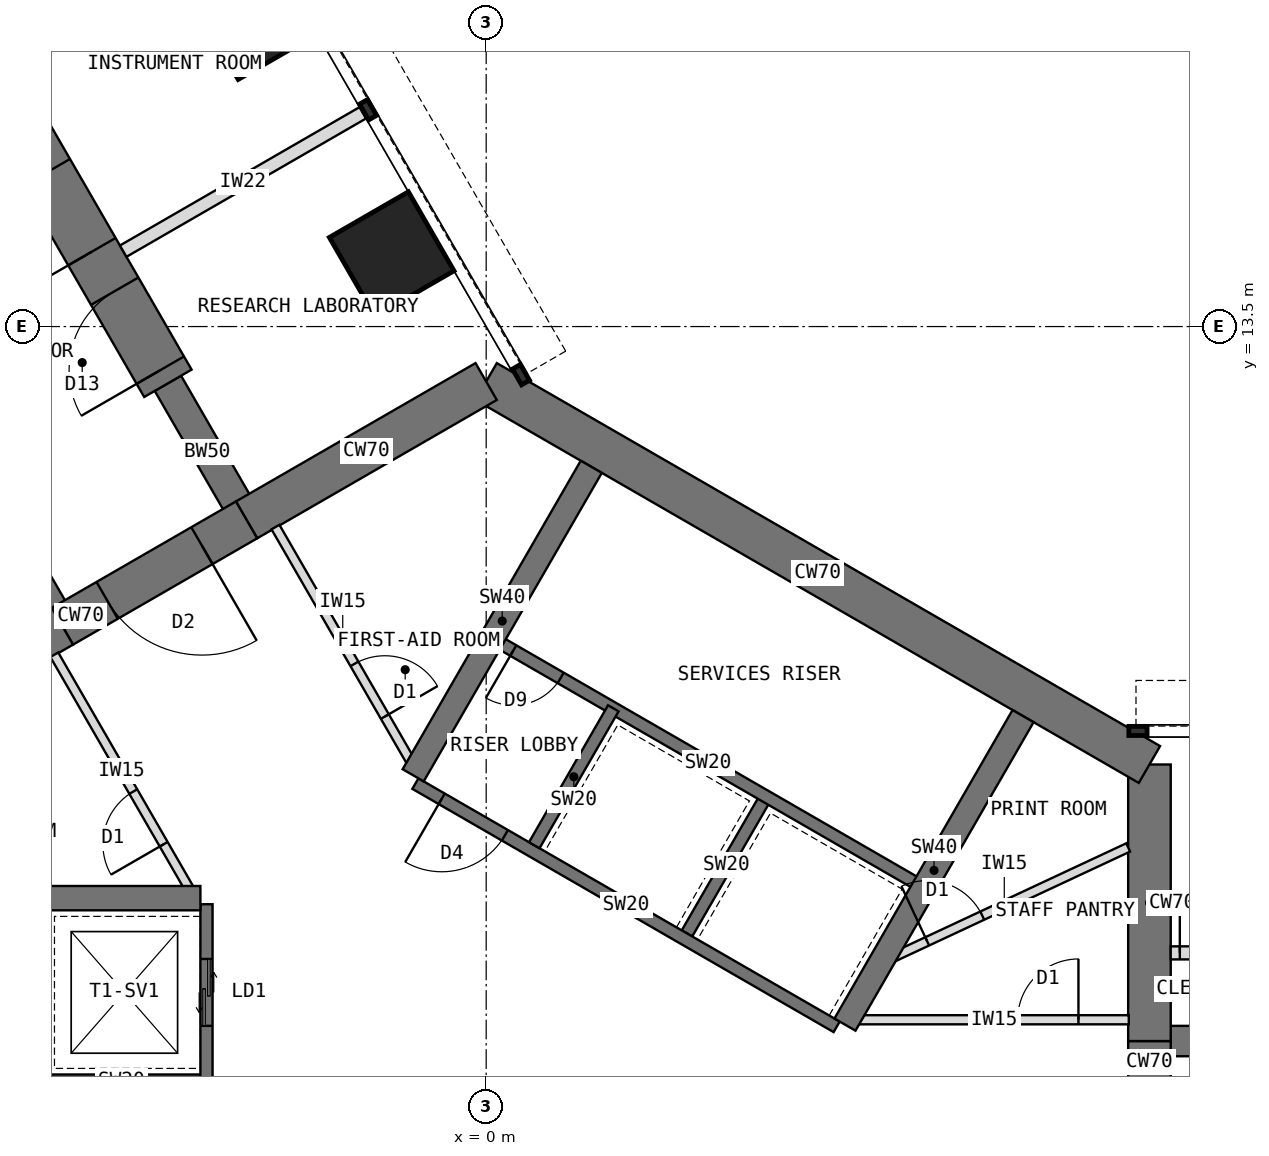
"""IFC4 building model, lengths in metres.
Left out: names, types, materials, properties, quantities, classifications, styles, units other than length and angle.
Written with IfcOpenShell. Run it as: python <this file> out.ifc"""

import sys

from ifc_helpers import new_model, si_unit, direction, frame, frame_2d, origin, origin_2d, place, context, subcontext, project, spatial, rectangle, extrude, element, fill, save


model = new_model("IFC4")
c1 = context("Model", 3, precision=1e-05, world=origin(), true_north=direction((0.0, 1.0)))
c2 = subcontext(c1, "Body", "Model", "MODEL_VIEW")
j1 = project(units=[si_unit("LENGTHUNIT", "METRE"), si_unit("PLANEANGLEUNIT", "RADIAN")], contexts=[c1])
p1 = place(None, origin())
s1 = spatial("IfcSite", under=j1, at=p1, CompositionType="ELEMENT")
p2 = place(p1, origin())
s2 = spatial("IfcBuilding", under=s1, at=p2, CompositionType="ELEMENT")
p3 = place(p2, frame((0.0, 0.0, 36.5)))
s3 = spatial("IfcBuildingStorey", under=s2, at=p3, CompositionType="ELEMENT", Elevation=36.5)
p4 = place(p3, frame((10.908, -1.75, 0.0), z_axis=(0.0, 0.0, 1.0), x_axis=(0.0, 1.0, 0.0)))
e1 = element("IfcWall", 1, at=p4, inside=s3, PredefinedType="SHEAR", context=c2, shape_type="SweptSolid", body=[
    extrude(rectangle(XDim=3.5, YDim=0.7, at=frame_2d((1.75, 0.0))), origin(), (0.0, 0.0, 1.0), 4.0),
])
p5 = place(p4, frame((0.85, 0.0, 0.0)))
e2 = element("IfcOpeningElement", 2, at=p5, cuts=e1, PredefinedType="OPENING", context=c2, shape_type="SweptSolid", body=[
    extrude(rectangle(XDim=1.8, YDim=2.1, at=frame_2d((0.9, 1.05))), frame((0.0, 0.36, 0.0), z_axis=(0.0, -1.0, 0.0), x_axis=(1.0, 0.0, 0.0)), (0.0, 0.0, 1.0), 0.72),
])
p6 = place(p3, frame((10.908, 1.75, 0.0), z_axis=(0.0, 0.0, 1.0), x_axis=(0.0, 1.0, 0.0)))
e3 = element("IfcWall", 3, at=p6, inside=s3, PredefinedType="SHEAR", context=c2, shape_type="SweptSolid", body=[
    extrude(rectangle(XDim=4.548, YDim=0.7, at=frame_2d((2.274, 0.0))), origin(), (0.0, 0.0, 1.0), 4.0),
])
p7 = place(p3, frame((10.908, 6.298, 0.0), z_axis=(0.0, 0.0, 1.0), x_axis=(-0.866021940709, 0.500005998175, 0.0)))
e4 = element("IfcWall", 4, at=p7, inside=s3, PredefinedType="SHEAR", context=c2, shape_type="SweptSolid", body=[
    extrude(rectangle(XDim=12.596, YDim=0.7, at=frame_2d((6.298, 0.0))), origin(), (0.0, 0.0, 1.0), 4.0),
])
p8 = place(p3, frame((0.0, 12.596, 0.0), z_axis=(0.0, 0.0, 1.0), x_axis=(-0.866011268655, -0.500024481964, 0.0)))
e5 = element("IfcWall", 5, at=p8, inside=s3, PredefinedType="SHEAR", context=c2, shape_type="SweptSolid", body=[
    extrude(rectangle(XDim=4.548, YDim=0.7, at=frame_2d((2.274, 0.0))), origin(), (0.0, 0.0, 1.0), 4.0),
])
p9 = place(p3, frame((-3.939, 10.322, 0.0), z_axis=(0.0, 0.0, 1.0), x_axis=(-0.866019471182, -0.500010275428, 0.0)))
e6 = element("IfcWall", 6, at=p9, inside=s3, PredefinedType="SHEAR", context=c2, shape_type="SweptSolid", body=[
    extrude(rectangle(XDim=3.5, YDim=0.7, at=frame_2d((1.75, 0.0))), origin(), (0.0, 0.0, 1.0), 4.0),
])
p10 = place(p9, frame((0.85, 0.0, 0.0)))
e7 = element("IfcOpeningElement", 7, at=p10, cuts=e6, PredefinedType="OPENING", context=c2, shape_type="SweptSolid", body=[
    extrude(rectangle(XDim=1.8, YDim=2.1, at=frame_2d((0.9, 1.05))), frame((0.0, 0.36, 0.0), z_axis=(0.0, -1.0, 0.0), x_axis=(1.0, 0.0, 0.0)), (0.0, 0.0, 1.0), 0.72),
])
p11 = place(p3, frame((-6.97, 8.572, 0.0), z_axis=(0.0, 0.0, 1.0), x_axis=(-0.866034513004, -0.499984222037, 0.0)))
e8 = element("IfcWall", 8, at=p11, inside=s3, PredefinedType="SHEAR", context=c2, shape_type="SweptSolid", body=[
    extrude(rectangle(XDim=4.548, YDim=0.7, at=frame_2d((2.274, 0.0))), origin(), (0.0, 0.0, 1.0), 4.0),
])
p12 = place(p3, frame((10.908, 1.75, 0.0), z_axis=(0.0, 0.0, 1.0), x_axis=(1.0, 0.0, 0.0)))
e9 = element("IfcWall", 9, at=p12, inside=s3, PredefinedType="SHEAR", context=c2, shape_type="SweptSolid", body=[
    extrude(rectangle(XDim=2.592, YDim=0.5, at=frame_2d((1.296, 0.0))), origin(), (0.0, 0.0, 1.0), 4.0),
])
for number, where, z_axis, x_axis in (
    (10, (-6.97, 8.572, 0.0), (0.0, 0.0, 1.0), (-0.5, 0.866, 0.0)),
    (11, (-3.939, 10.322, 0.0), (0.0, 0.0, 1.0), (-0.5, 0.866, 0.0)),
):
    element("IfcWall", number, at=place(p3, frame(where, z_axis=z_axis, x_axis=x_axis)), inside=s3, PredefinedType="SHEAR", context=c2, shape_type="SweptSolid", body=[
        extrude(rectangle(XDim=2.592, YDim=0.5, at=frame_2d((1.296, 0.0))), origin(), (0.0, 0.0, 1.0), 4.0),
    ])
p13 = place(p3, frame((-5.234, 12.566, 0.0), z_axis=(0.0, 0.0, 1.0), x_axis=(-0.500010103361, 0.866019570528, 0.0)))
e12 = element("IfcWall", 12, at=p13, inside=s3, PredefinedType="SHEAR", context=c2, shape_type="SweptSolid", body=[
    extrude(rectangle(XDim=13.2, YDim=0.9, at=frame_2d((6.6, 0.0))), origin(), (0.0, 0.0, 1.0), 4.0),
])
p14 = place(p13, frame((0.25, 0.0, 0.0)))
e13 = element("IfcOpeningElement", 13, at=p14, cuts=e12, PredefinedType="OPENING", context=c2, shape_type="SweptSolid", body=[
    extrude(rectangle(XDim=1.5, YDim=2.1, at=frame_2d((0.75, 1.05))), frame((0.0, 0.46, 0.0), z_axis=(0.0, -1.0, 0.0), x_axis=(1.0, 0.0, 0.0)), (0.0, 0.0, 1.0), 0.92),
])
p15 = place(p13, frame((2.5, 0.0, 0.0)))
e14 = element("IfcOpeningElement", 14, at=p15, cuts=e12, PredefinedType="OPENING", context=c2, shape_type="SweptSolid", body=[
    extrude(rectangle(XDim=1.5, YDim=2.1, at=frame_2d((0.75, 1.05))), frame((0.0, 0.46, 0.0), z_axis=(0.0, -1.0, 0.0), x_axis=(1.0, 0.0, 0.0)), (0.0, 0.0, 1.0), 0.92),
])
for number, where, z_axis, x_axis in (
    (15, (-1.554, 14.691, 0.0), (0.0, 0.0, 1.0), (0.866, 0.5, 0.0)),
    (16, (-3.804, 18.588, 0.0), (0.0, 0.0, 1.0), (0.866, 0.5, 0.0)),
):
    element("IfcColumn", number, at=place(p3, frame(where, z_axis=z_axis, x_axis=x_axis)), inside=s3, PredefinedType="COLUMN", context=c2, shape_type="SweptSolid", body=[
        extrude(rectangle(XDim=1.5, YDim=1.5, at=origin_2d()), origin(), (0.0, 0.0, 1.0), 4.0),
    ])
p16 = place(p3, frame((5.764, 1.984, 0.0), z_axis=(0.0, 0.0, 1.0), x_axis=(-0.866026010844, 0.49999894854, 0.0)))
e17 = element("IfcWall", 17, at=p16, inside=s3, PredefinedType="SHEAR", context=c2, shape_type="SweptSolid", body=[
    extrude(rectangle(XDim=8.0, YDim=0.2, at=frame_2d((4.0, 0.0))), origin(), (0.0, 0.0, 1.0), 4.0),
])
p17 = place(p16, frame((6.3, 0.0, 0.0)))
e18 = element("IfcOpeningElement", 18, at=p17, cuts=e17, PredefinedType="OPENING", context=c2, shape_type="SweptSolid", body=[
    extrude(rectangle(XDim=1.2, YDim=2.1, at=frame_2d((0.6, 1.05))), frame((0.0, 0.11, 0.0), z_axis=(0.0, -1.0, 0.0), x_axis=(1.0, 0.0, 0.0)), (0.0, 0.0, 1.0), 0.22),
])
for number, where, z_axis, x_axis in (
    (19, (3.303, 3.52, 0.0), (0.0, 0.0, 1.0), (0.5, 0.866, 0.0)),
    (20, (0.791, 4.97, 0.0), (0.0, 0.0, 1.0), (0.5, 0.866, 0.0)),
):
    element("IfcWall", number, at=place(p3, frame(where, z_axis=z_axis, x_axis=x_axis)), inside=s3, PredefinedType="SHEAR", context=c2, shape_type="SweptSolid", body=[
        extrude(rectangle(XDim=2.6, YDim=0.2, at=frame_2d((1.3, 0.0))), origin(), (0.0, 0.0, 1.0), 4.0),
    ])
p18 = place(p3, frame((7.114, 4.322, 0.0), z_axis=(0.0, 0.0, 1.0), x_axis=(-0.866026010844, 0.49999894854, 0.0)))
e21 = element("IfcWall", 21, at=p18, inside=s3, PredefinedType="SHEAR", context=c2, shape_type="SweptSolid", body=[
    extrude(rectangle(XDim=8.0, YDim=0.2, at=frame_2d((4.0, 0.0))), origin(), (0.0, 0.0, 1.0), 4.0),
])
p19 = place(p18, frame((6.8, 0.0, 0.0)))
e22 = element("IfcOpeningElement", 22, at=p19, cuts=e21, PredefinedType="OPENING", context=c2, shape_type="SweptSolid", body=[
    extrude(rectangle(XDim=0.9, YDim=2.1, at=frame_2d((0.45, 1.05))), frame((0.0, 0.11, 0.0), z_axis=(0.0, -1.0, 0.0), x_axis=(1.0, 0.0, 0.0)), (0.0, 0.0, 1.0), 0.22),
])
for number, where, z_axis, x_axis in (
    (23, (-1.201, 6.12, 0.0), (0.0, 0.0, 1.0), (0.5, 0.866, 0.0)),
    (24, (5.901, 2.02, 0.0), (0.0, 0.0, 1.0), (0.5, 0.866, 0.0)),
):
    element("IfcWall", number, at=place(p3, frame(where, z_axis=z_axis, x_axis=x_axis)), inside=s3, PredefinedType="SHEAR", context=c2, shape_type="SweptSolid", body=[
        extrude(rectangle(XDim=5.858, YDim=0.4, at=frame_2d((2.929, 0.0))), origin(), (0.0, 0.0, 1.0), 4.0),
    ])
p20 = place(p3, frame((-4.6, 4.0, 0.0), z_axis=(0.0, 0.0, 1.0), x_axis=(0.0, -1.0, 0.0)))
e25 = element("IfcWall", 25, at=p20, inside=s3, PredefinedType="SHEAR", context=c2, shape_type="SweptSolid", body=[
    extrude(rectangle(XDim=8.0, YDim=0.2, at=frame_2d((4.0, 0.0))), origin(), (0.0, 0.0, 1.0), 4.0),
])
p21 = place(p20, frame((6.3, 0.0, 0.0)))
e26 = element("IfcOpeningElement", 26, at=p21, cuts=e25, PredefinedType="OPENING", context=c2, shape_type="SweptSolid", body=[
    extrude(rectangle(XDim=1.2, YDim=2.1, at=frame_2d((0.6, 1.05))), frame((0.0, 0.11, 0.0), z_axis=(0.0, -1.0, 0.0), x_axis=(1.0, 0.0, 0.0)), (0.0, 0.0, 1.0), 0.22),
])
p22 = place(p20, frame((0.9, 0.0, 0.0)))
e27 = element("IfcOpeningElement", 27, at=p22, cuts=e25, PredefinedType="OPENING", context=c2, shape_type="SweptSolid", body=[
    extrude(rectangle(XDim=1.1, YDim=2.2, at=frame_2d((0.55, 1.1))), frame((0.0, 0.11, 0.0), z_axis=(0.0, -1.0, 0.0), x_axis=(1.0, 0.0, 0.0)), (0.0, 0.0, 1.0), 0.22),
])
p23 = place(p3, frame((-4.7, 1.1, 0.0), z_axis=(0.0, 0.0, 1.0), x_axis=(-1.0, 0.0, 0.0)))
e28 = element("IfcWall", 28, at=p23, inside=s3, PredefinedType="SHEAR", context=c2, shape_type="SweptSolid", body=[
    extrude(rectangle(XDim=2.6, YDim=0.2, at=frame_2d((1.3, 0.0))), origin(), (0.0, 0.0, 1.0), 4.0),
])
p24 = place(p3, frame((-4.7, 4.1, 0.0), z_axis=(0.0, 0.0, 1.0), x_axis=(-1.0, 0.0, 0.0)))
e29 = element("IfcWall", 29, at=p24, inside=s3, PredefinedType="SHEAR", context=c2, shape_type="SweptSolid", body=[
    extrude(rectangle(XDim=5.858, YDim=0.4, at=frame_2d((2.929, 0.0))), origin(), (0.0, 0.0, 1.0), 4.0),
])
p25 = place(p3, frame((11.258, 3.2, 0.0), z_axis=(0.0, 0.0, 1.0), x_axis=(1.0, 0.0, 0.0)))
e30 = element("IfcWall", 30, at=p25, inside=s3, PredefinedType="PARTITIONING", context=c2, shape_type="SweptSolid", body=[
    extrude(rectangle(XDim=2.4, YDim=0.215, at=frame_2d((1.2, 0.0))), origin(), (0.0, 0.0, 1.0), 3.8),
])
p26 = place(p25, frame((0.15, 0.0, 0.0)))
e31 = element("IfcOpeningElement", 31, at=p26, cuts=e30, PredefinedType="OPENING", context=c2, shape_type="SweptSolid", body=[
    extrude(rectangle(XDim=0.9, YDim=2.1, at=frame_2d((0.45, 1.05))), frame((0.0, 0.117, 0.0), z_axis=(0.0, -1.0, 0.0), x_axis=(1.0, 0.0, 0.0)), (0.0, 0.0, 1.0), 0.235),
])
p27 = place(p3, frame((-5.97, 14.74, 0.0), z_axis=(0.0, 0.0, 1.0), x_axis=(0.866035472144, 0.499982560684, 0.0)))
e32 = element("IfcWall", 32, at=p27, inside=s3, PredefinedType="PARTITIONING", context=c2, shape_type="SweptSolid", body=[
    extrude(rectangle(XDim=4.55, YDim=0.215, at=frame_2d((2.275, 0.0))), origin(), (0.0, 0.0, 1.0), 3.8),
])
p28 = place(p3, frame((-4.89, 4.27, 0.0), z_axis=(0.0, 0.0, 1.0), x_axis=(-0.500007369519, 0.866021148949, 0.0)))
e33 = element("IfcWall", 33, at=p28, inside=s3, PredefinedType="PARTITIONING", context=c2, shape_type="SweptSolid", body=[
    extrude(rectangle(XDim=4.426, YDim=0.15, at=frame_2d((2.213, 0.0))), origin(), (0.0, 0.0, 1.0), 3.8),
])
p29 = place(p28, frame((0.828, 0.0, 0.0)))
e34 = element("IfcOpeningElement", 34, at=p29, cuts=e33, PredefinedType="OPENING", context=c2, shape_type="SweptSolid", body=[
    extrude(rectangle(XDim=1.0, YDim=2.1, at=frame_2d((0.5, 1.05))), frame((0.0, 0.085, 0.0), z_axis=(0.0, -1.0, 0.0), x_axis=(1.0, 0.0, 0.0)), (0.0, 0.0, 1.0), 0.17),
])
p30 = place(p3, frame((-3.466, 10.202, 0.0), z_axis=(0.0, 0.0, 1.0), x_axis=(0.500007369519, -0.866021148949, 0.0)))
e35 = element("IfcWall", 35, at=p30, inside=s3, PredefinedType="PARTITIONING", context=c2, shape_type="SweptSolid", body=[
    extrude(rectangle(XDim=4.426, YDim=0.15, at=frame_2d((2.213, 0.0))), origin(), (0.0, 0.0, 1.0), 3.8),
])
p31 = place(p30, frame((2.598, 0.0, 0.0)))
e36 = element("IfcOpeningElement", 36, at=p31, cuts=e35, PredefinedType="OPENING", context=c2, shape_type="SweptSolid", body=[
    extrude(rectangle(XDim=1.0, YDim=2.1, at=frame_2d((0.5, 1.05))), frame((0.0, 0.085, 0.0), z_axis=(0.0, -1.0, 0.0), x_axis=(1.0, 0.0, 0.0)), (0.0, 0.0, 1.0), 0.17),
])
p32 = place(p3, frame((6.143, 2.1, 0.0), z_axis=(0.0, 0.0, 1.0), x_axis=(1.0, 0.0, 0.0)))
e37 = element("IfcWall", 37, at=p32, inside=s3, PredefinedType="PARTITIONING", context=c2, shape_type="SweptSolid", body=[
    extrude(rectangle(XDim=4.426, YDim=0.15, at=frame_2d((2.213, 0.0))), origin(), (0.0, 0.0, 1.0), 3.8),
])
p33 = place(p32, frame((2.598, 0.0, 0.0)))
e38 = element("IfcOpeningElement", 38, at=p33, cuts=e37, PredefinedType="OPENING", context=c2, shape_type="SweptSolid", body=[
    extrude(rectangle(XDim=1.0, YDim=2.1, at=frame_2d((0.5, 1.05))), frame((0.0, 0.085, 0.0), z_axis=(0.0, -1.0, 0.0), x_axis=(1.0, 0.0, 0.0)), (0.0, 0.0, 1.0), 0.17),
])
p34 = place(p3, frame((6.483, 3.03, 0.0), z_axis=(0.0, 0.0, 1.0), x_axis=(0.905977801603, 0.423325197694, 0.0)))
e39 = element("IfcWall", 39, at=p34, inside=s3, PredefinedType="PARTITIONING", context=c2, shape_type="SweptSolid", body=[
    extrude(rectangle(XDim=4.498, YDim=0.15, at=frame_2d((2.249, 0.0))), origin(), (0.0, 0.0, 1.0), 3.8),
])
p35 = place(p34, frame((0.849, 0.0, 0.0)))
e40 = element("IfcOpeningElement", 40, at=p35, cuts=e39, PredefinedType="OPENING", context=c2, shape_type="SweptSolid", body=[
    extrude(rectangle(XDim=1.0, YDim=2.1, at=frame_2d((0.5, 1.05))), frame((0.0, 0.085, 0.0), z_axis=(0.0, -1.0, 0.0), x_axis=(1.0, 0.0, 0.0)), (0.0, 0.0, 1.0), 0.17),
])
p36 = place(p17, origin())
e41 = element("IfcDoor", 41, at=p36, inside=s3, OperationType="SINGLE_SWING_RIGHT", PredefinedType="DOOR", context=c2, shape_type="SweptSolid", body=[
    extrude(rectangle(XDim=1.2, YDim=2.1, at=frame_2d((0.6, 1.05))), frame((0.0, 0.025, 0.0), z_axis=(0.0, -1.0, 0.0), x_axis=(1.0, 0.0, 0.0)), (0.0, 0.0, 1.0), 0.05),
])
fill(e18, e41)
p37 = place(p19, origin())
e42 = element("IfcDoor", 42, at=p37, inside=s3, OperationType="SINGLE_SWING_RIGHT", PredefinedType="DOOR", context=c2, shape_type="SweptSolid", body=[
    extrude(rectangle(XDim=0.9, YDim=2.1, at=frame_2d((0.45, 1.05))), frame((0.0, 0.025, 0.0), z_axis=(0.0, -1.0, 0.0), x_axis=(1.0, 0.0, 0.0)), (0.0, 0.0, 1.0), 0.05),
])
fill(e22, e42)
p38 = place(p22, origin())
e43 = element("IfcDoor", 43, at=p38, inside=s3, OperationType="DOUBLE_DOOR_SLIDING", PredefinedType="DOOR", context=c2, shape_type="SweptSolid", body=[
    extrude(rectangle(XDim=1.1, YDim=2.2, at=frame_2d((0.55, 1.1))), frame((0.0, 0.025, 0.0), z_axis=(0.0, -1.0, 0.0), x_axis=(1.0, 0.0, 0.0)), (0.0, 0.0, 1.0), 0.05),
])
fill(e27, e43)
p39 = place(p10, origin())
e44 = element("IfcDoor", 44, at=p39, inside=s3, OperationType="DOUBLE_DOOR_DOUBLE_SWING", PredefinedType="DOOR", context=c2, shape_type="SweptSolid", body=[
    extrude(rectangle(XDim=1.72, YDim=2.06, at=frame_2d((0.9, 1.03))), frame((0.0, 0.025, 0.0), z_axis=(0.0, -1.0, 0.0), x_axis=(1.0, 0.0, 0.0)), (0.0, 0.0, 1.0), 0.05),
    extrude(rectangle(XDim=0.04, YDim=2.1, at=frame_2d((0.02, 1.05))), frame((0.0, 0.35, 0.0), z_axis=(0.0, -1.0, 0.0), x_axis=(1.0, 0.0, 0.0)), (0.0, 0.0, 1.0), 0.699),
    extrude(rectangle(XDim=0.04, YDim=2.1, at=frame_2d((1.78, 1.05))), frame((0.0, 0.35, 0.0), z_axis=(0.0, -1.0, 0.0), x_axis=(1.0, 0.0, 0.0)), (0.0, 0.0, 1.0), 0.699),
    extrude(rectangle(XDim=1.72, YDim=0.04, at=frame_2d((0.9, 2.08))), frame((0.0, 0.35, 0.0), z_axis=(0.0, -1.0, 0.0), x_axis=(1.0, 0.0, 0.0)), (0.0, 0.0, 1.0), 0.699),
])
fill(e7, e44)
p40 = place(p26, origin())
e45 = element("IfcDoor", 45, at=p40, inside=s3, OperationType="SINGLE_SWING_LEFT", PredefinedType="DOOR", context=c2, shape_type="SweptSolid", body=[
    extrude(rectangle(XDim=0.9, YDim=2.1, at=frame_2d((0.45, 1.05))), frame((0.0, 0.025, 0.0), z_axis=(0.0, -1.0, 0.0), x_axis=(1.0, 0.0, 0.0)), (0.0, 0.0, 1.0), 0.05),
])
fill(e31, e45)
p41 = place(p33, origin())
e46 = element("IfcDoor", 46, at=p41, inside=s3, OperationType="SINGLE_SWING_RIGHT", PredefinedType="DOOR", context=c2, shape_type="SweptSolid", body=[
    extrude(rectangle(XDim=1.0, YDim=2.1, at=frame_2d((0.5, 1.05))), frame((0.0, 0.025, 0.0), z_axis=(0.0, -1.0, 0.0), x_axis=(1.0, 0.0, 0.0)), (0.0, 0.0, 1.0), 0.05),
])
fill(e38, e46)
p42 = place(p35, origin())
e47 = element("IfcDoor", 47, at=p42, inside=s3, OperationType="SINGLE_SWING_LEFT", PredefinedType="DOOR", context=c2, shape_type="SweptSolid", body=[
    extrude(rectangle(XDim=1.0, YDim=2.1, at=frame_2d((0.5, 1.05))), frame((0.0, 0.025, 0.0), z_axis=(0.0, -1.0, 0.0), x_axis=(1.0, 0.0, 0.0)), (0.0, 0.0, 1.0), 0.05),
])
fill(e40, e47)
p43 = place(p31, origin())
e48 = element("IfcDoor", 48, at=p43, inside=s3, OperationType="SINGLE_SWING_RIGHT", PredefinedType="DOOR", context=c2, shape_type="SweptSolid", body=[
    extrude(rectangle(XDim=1.0, YDim=2.1, at=frame_2d((0.5, 1.05))), frame((0.0, 0.025, 0.0), z_axis=(0.0, -1.0, 0.0), x_axis=(1.0, 0.0, 0.0)), (0.0, 0.0, 1.0), 0.05),
])
fill(e36, e48)
p44 = place(p29, origin())
e49 = element("IfcDoor", 49, at=p44, inside=s3, OperationType="SINGLE_SWING_LEFT", PredefinedType="DOOR", context=c2, shape_type="SweptSolid", body=[
    extrude(rectangle(XDim=1.0, YDim=2.1, at=frame_2d((0.5, 1.05))), frame((0.0, 0.025, 0.0), z_axis=(0.0, -1.0, 0.0), x_axis=(1.0, 0.0, 0.0)), (0.0, 0.0, 1.0), 0.05),
])
fill(e34, e49)
p45 = place(p14, origin())
e50 = element("IfcDoor", 50, at=p45, inside=s3, OperationType="DOUBLE_DOOR_SINGLE_SWING", PredefinedType="DOOR", context=c2, shape_type="SweptSolid", body=[
    extrude(rectangle(XDim=1.42, YDim=2.06, at=frame_2d((0.75, 1.03))), frame((0.0, 0.025, 0.0), z_axis=(0.0, -1.0, 0.0), x_axis=(1.0, 0.0, 0.0)), (0.0, 0.0, 1.0), 0.05),
    extrude(rectangle(XDim=0.04, YDim=2.1, at=frame_2d((0.02, 1.05))), frame((0.0, 0.45, 0.0), z_axis=(0.0, -1.0, 0.0), x_axis=(1.0, 0.0, 0.0)), (0.0, 0.0, 1.0), 0.899),
    extrude(rectangle(XDim=0.04, YDim=2.1, at=frame_2d((1.48, 1.05))), frame((0.0, 0.45, 0.0), z_axis=(0.0, -1.0, 0.0), x_axis=(1.0, 0.0, 0.0)), (0.0, 0.0, 1.0), 0.899),
    extrude(rectangle(XDim=1.42, YDim=0.04, at=frame_2d((0.75, 2.08))), frame((0.0, 0.45, 0.0), z_axis=(0.0, -1.0, 0.0), x_axis=(1.0, 0.0, 0.0)), (0.0, 0.0, 1.0), 0.899),
])
fill(e13, e50)
p46 = place(p15, origin())
e51 = element("IfcDoor", 51, at=p46, inside=s3, OperationType="DOUBLE_DOOR_SINGLE_SWING", PredefinedType="DOOR", context=c2, shape_type="SweptSolid", body=[
    extrude(rectangle(XDim=1.42, YDim=2.06, at=frame_2d((0.75, 1.03))), frame((0.0, 0.025, 0.0), z_axis=(0.0, -1.0, 0.0), x_axis=(1.0, 0.0, 0.0)), (0.0, 0.0, 1.0), 0.05),
    extrude(rectangle(XDim=0.04, YDim=2.1, at=frame_2d((0.02, 1.05))), frame((0.0, 0.45, 0.0), z_axis=(0.0, -1.0, 0.0), x_axis=(1.0, 0.0, 0.0)), (0.0, 0.0, 1.0), 0.899),
    extrude(rectangle(XDim=0.04, YDim=2.1, at=frame_2d((1.48, 1.05))), frame((0.0, 0.45, 0.0), z_axis=(0.0, -1.0, 0.0), x_axis=(1.0, 0.0, 0.0)), (0.0, 0.0, 1.0), 0.899),
    extrude(rectangle(XDim=1.42, YDim=0.04, at=frame_2d((0.75, 2.08))), frame((0.0, 0.45, 0.0), z_axis=(0.0, -1.0, 0.0), x_axis=(1.0, 0.0, 0.0)), (0.0, 0.0, 1.0), 0.899),
])
fill(e14, e51)
save(model, sys.argv[1])
